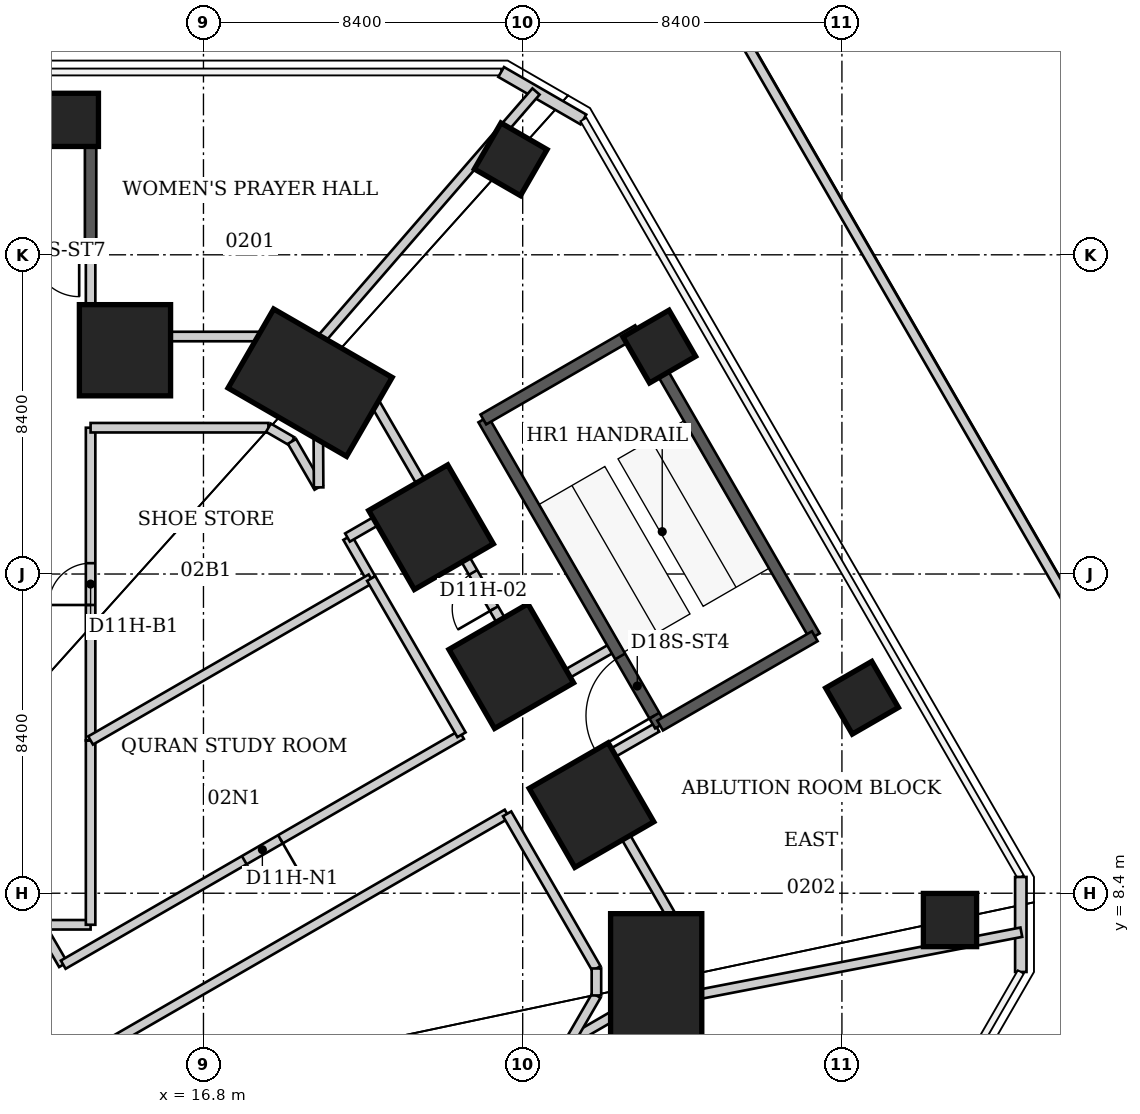
"""IFC4 building model, lengths in metres.
Left out: names, types, materials, properties, quantities, classifications, styles, units other than length and angle.
Written with IfcOpenShell. Run it as: python <this file> out.ifc"""

import sys

from ifc_helpers import new_model, si_unit, direction, frame, frame_2d, origin, origin_2d, place, context, subcontext, project, spatial, rectangle, extrude, element, fill, save


model = new_model("IFC4")
c1 = context("Model", 3, precision=1e-05, world=origin(), true_north=direction((0.0, 1.0)))
c2 = subcontext(c1, "Body", "Model", "MODEL_VIEW")
j1 = project(units=[si_unit("LENGTHUNIT", "METRE"), si_unit("PLANEANGLEUNIT", "RADIAN")], contexts=[c1])
p1 = place(None, origin())
s1 = spatial("IfcSite", under=j1, at=p1, CompositionType="ELEMENT")
p2 = place(p1, origin())
s2 = spatial("IfcBuilding", under=s1, at=p2, CompositionType="ELEMENT")
p3 = place(p2, frame((0.0, 0.0, 12.0)))
s3 = spatial("IfcBuildingStorey", under=s2, at=p3, CompositionType="ELEMENT", Elevation=12.0)
p4 = place(p3, frame((14.735, 22.689, 0.0), z_axis=(0.0, 0.0, 1.0), x_axis=(0.0, 1.0, 0.0)))
e1 = element("IfcColumn", 1, at=p4, inside=s3, PredefinedType="COLUMN", context=c2, shape_type="SweptSolid", body=[
    extrude(rectangle(XDim=2.4, YDim=2.4, at=origin_2d()), origin(), (0.0, 0.0, 1.0), 6.0),
])
p5 = place(p3, frame((19.606, 21.835, 0.0), z_axis=(0.0, 0.0, 1.0), x_axis=(0.5, 0.866025403784, 0.0)))
e2 = element("IfcColumn", 2, at=p5, inside=s3, PredefinedType="COLUMN", context=c2, shape_type="SweptSolid", body=[
    extrude(rectangle(XDim=2.4, YDim=3.6, at=origin_2d()), origin(), (0.0, 0.0, 1.0), 6.0),
])
for number, where, z_axis, x_axis in (
    (3, (22.788, 18.032, 0.0), (0.0, 0.0, 1.0), (0.866, 0.5, 0.0)),
    (4, (24.899, 14.375, 0.0), (0.0, 0.0, 1.0), (0.866, 0.5, 0.0)),
    (5, (27.01, 10.719, 0.0), (0.0, 0.0, 1.0), (0.866, 0.5, 0.0)),
):
    element("IfcColumn", number, at=place(p3, frame(where, z_axis=z_axis, x_axis=x_axis)), inside=s3, PredefinedType="COLUMN", context=c2, shape_type="SweptSolid", body=[
        extrude(rectangle(XDim=2.4, YDim=2.4, at=origin_2d()), origin(), (0.0, 0.0, 1.0), 6.0),
    ])
p6 = place(p3, frame((28.713, 6.062, 0.0), z_axis=(0.0, 0.0, 1.0), x_axis=(1.0, 0.0, 0.0)))
e6 = element("IfcColumn", 6, at=p6, inside=s3, PredefinedType="COLUMN", context=c2, shape_type="SweptSolid", body=[
    extrude(rectangle(XDim=2.4, YDim=3.6, at=origin_2d()), origin(), (0.0, 0.0, 1.0), 6.0),
])
for number, where, z_axis, x_axis in (
    (7, (13.337, 28.751, 0.0), (0.0, 0.0, 1.0), (0.0, 1.0, 0.0)),
    (8, (24.885, 27.714, 0.0), (0.0, 0.0, 1.0), (0.5, 0.866, 0.0)),
    (9, (28.794, 22.785, 0.0), (0.0, 0.0, 1.0), (0.866, 0.5, 0.0)),
    (10, (34.129, 13.544, 0.0), (0.0, 0.0, 1.0), (0.866, 0.5, 0.0)),
    (11, (36.443, 7.694, 0.0), (0.0, 0.0, 1.0), (1.0, 0.0, 0.0)),
):
    element("IfcColumn", number, at=place(p3, frame(where, z_axis=z_axis, x_axis=x_axis)), inside=s3, PredefinedType="COLUMN", context=c2, shape_type="SweptSolid", body=[
        extrude(rectangle(XDim=1.4, YDim=1.4, at=origin_2d()), origin(), (0.0, 0.0, 1.0), 6.0),
    ])
p7 = place(p3, frame((24.633, 30.011, 0.0), z_axis=(0.0, 0.0, 1.0), x_axis=(0.866047370643, -0.499961950354, 0.0)))
e12 = element("IfcWall", 12, at=p7, inside=s3, PredefinedType="SOLIDWALL", context=c2, shape_type="SweptSolid", body=[
    extrude(rectangle(XDim=2.5, YDim=0.3, at=frame_2d((1.25, 0.0))), origin(), (0.0, 0.0, 1.0), 5.6),
])
p8 = place(p3, frame((38.307, 8.828, 0.0), z_axis=(0.0, 0.0, 1.0), x_axis=(0.0, -1.0, 0.0)))
e13 = element("IfcWall", 13, at=p8, inside=s3, PredefinedType="SOLIDWALL", context=c2, shape_type="SweptSolid", body=[
    extrude(rectangle(XDim=2.5, YDim=0.3, at=frame_2d((1.25, 0.0))), origin(), (0.0, 0.0, 1.0), 5.6),
])
p9 = place(p3, frame((15.455, -40.895, 0.0), z_axis=(0.0, 0.0, 1.0), x_axis=(0.500000660882, 0.866025022224, 0.0)))
e14 = element("IfcWall", 14, at=p9, inside=s3, PredefinedType="PARAPET", context=c2, shape_type="SweptSolid", body=[
    extrude(rectangle(XDim=55.377, YDim=0.25, at=frame_2d((27.688, 0.0))), origin(), (0.0, 0.0, 1.0), 1.1),
])
p10 = place(p3, frame((43.146, 9.854, 0.0), z_axis=(0.0, 0.0, 1.0), x_axis=(-0.500004465561, 0.866022825576, 0.0)))
e15 = element("IfcWall", 15, at=p10, inside=s3, PredefinedType="PARAPET", context=c2, shape_type="SweptSolid", body=[
    extrude(rectangle(XDim=26.078, YDim=0.25, at=frame_2d((13.039, 0.0))), origin(), (0.0, 0.0, 1.0), 1.1),
])
p11 = place(p3, frame((12.23, 3.24, 0.0), z_axis=(0.0, 0.0, 1.0), x_axis=(0.866071776036, 0.499919672301, 0.0)))
e16 = element("IfcWall", 16, at=p11, inside=s3, PredefinedType="PARTITIONING", context=c2, shape_type="SweptSolid", body=[
    extrude(rectangle(XDim=14.502, YDim=0.25, at=frame_2d((7.251, 0.0))), origin(), (0.0, 0.0, 1.0), 5.84),
])
p12 = place(p3, frame((12.5, 7.57, 0.0), z_axis=(0.0, 0.0, 1.0), x_axis=(1.0, 0.0, 0.0)))
e17 = element("IfcWall", 17, at=p12, inside=s3, PredefinedType="PARTITIONING", context=c2, shape_type="SweptSolid", body=[
    extrude(rectangle(XDim=1.33, YDim=0.25, at=frame_2d((0.665, 0.0))), origin(), (0.0, 0.0, 1.0), 5.84),
])
p13 = place(p3, frame((13.11, 6.52, 0.0), z_axis=(0.0, 0.0, 1.0), x_axis=(-0.502382838514, 0.864645293497, 0.0)))
e18 = element("IfcWall", 18, at=p13, inside=s3, PredefinedType="PARTITIONING", context=c2, shape_type="SweptSolid", body=[
    extrude(rectangle(XDim=1.214, YDim=0.25, at=frame_2d((0.607, 0.0))), origin(), (0.0, 0.0, 1.0), 5.84),
])
p14 = place(p3, frame((13.83, 7.57, 0.0), z_axis=(0.0, 0.0, 1.0), x_axis=(0.0, 1.0, 0.0)))
e19 = element("IfcWall", 19, at=p14, inside=s3, PredefinedType="PARTITIONING", context=c2, shape_type="SweptSolid", body=[
    extrude(rectangle(XDim=4.85, YDim=0.25, at=frame_2d((2.425, 0.0))), origin(), (0.0, 0.0, 1.0), 5.84),
])
p15 = place(p3, frame((13.83, 12.42, 0.0), z_axis=(0.0, 0.0, 1.0), x_axis=(0.0, 1.0, 0.0)))
e20 = element("IfcWall", 20, at=p15, inside=s3, PredefinedType="PARTITIONING", context=c2, shape_type="SweptSolid", body=[
    extrude(rectangle(XDim=8.23, YDim=0.25, at=frame_2d((4.115, 0.0))), origin(), (0.0, 0.0, 1.0), 5.84),
])
p16 = place(p15, frame((3.565, 0.0, 0.0)))
e21 = element("IfcOpeningElement", 21, at=p16, cuts=e20, PredefinedType="OPENING", context=c2, shape_type="SweptSolid", body=[
    extrude(rectangle(XDim=1.1, YDim=2.2, at=frame_2d((0.55, 1.1))), frame((0.0, 0.125, 0.0), z_axis=(0.0, -1.0, 0.0), x_axis=(1.0, 0.0, 0.0)), (0.0, 0.0, 1.0), 0.25),
])
p17 = place(p3, frame((13.83, 20.65, 0.0), z_axis=(0.0, 0.0, 1.0), x_axis=(1.0, 0.0, 0.0)))
e22 = element("IfcWall", 22, at=p17, inside=s3, PredefinedType="PARTITIONING", context=c2, shape_type="SweptSolid", body=[
    extrude(rectangle(XDim=4.68, YDim=0.25, at=frame_2d((2.34, 0.0))), origin(), (0.0, 0.0, 1.0), 5.84),
])
p18 = place(p3, frame((13.83, 23.05, 0.0), z_axis=(0.0, 0.0, 1.0), x_axis=(0.0, 1.0, 0.0)))
e23 = element("IfcWall", 23, at=p18, inside=s3, PredefinedType="PARTITIONING", context=c2, shape_type="SweptSolid", body=[
    extrude(rectangle(XDim=2.15, YDim=0.25, at=frame_2d((1.075, 0.0))), origin(), (0.0, 0.0, 1.0), 5.6),
])
p19 = place(p3, frame((17.25, -16.23, 0.0), z_axis=(0.0, 0.0, 1.0), x_axis=(0.499945975705, 0.866056592479, 0.0)))
e24 = element("IfcWall", 24, at=p19, inside=s3, PredefinedType="PARTITIONING", context=c2, shape_type="SweptSolid", body=[
    extrude(rectangle(XDim=24.583, YDim=0.25, at=frame_2d((12.292, 0.0))), origin(), (0.0, 0.0, 1.0), 4.04),
])
p20 = place(p3, frame((18.51, 20.65, 0.0), z_axis=(0.0, 0.0, 1.0), x_axis=(0.864827114446, -0.502069778138, 0.0)))
e25 = element("IfcWall", 25, at=p20, inside=s3, PredefinedType="PARTITIONING", context=c2, shape_type="SweptSolid", body=[
    extrude(rectangle(XDim=0.717, YDim=0.25, at=frame_2d((0.358, 0.0))), origin(), (0.0, 0.0, 1.0), 5.84),
])
p21 = place(p3, frame((19.13, 20.29, 0.0), z_axis=(0.0, 0.0, 1.0), x_axis=(0.500871040665, -0.865521923826, 0.0)))
e26 = element("IfcWall", 26, at=p21, inside=s3, PredefinedType="PARTITIONING", context=c2, shape_type="SweptSolid", body=[
    extrude(rectangle(XDim=1.398, YDim=0.25, at=frame_2d((0.699, 0.0))), origin(), (0.0, 0.0, 1.0), 5.84),
])
p22 = place(p3, frame((19.15, 23.05, 0.0), z_axis=(0.0, 0.0, 1.0), x_axis=(-1.0, 0.0, 0.0)))
e27 = element("IfcWall", 27, at=p22, inside=s3, PredefinedType="PARTITIONING", context=c2, shape_type="SweptSolid", body=[
    extrude(rectangle(XDim=5.32, YDim=0.25, at=frame_2d((2.66, 0.0))), origin(), (0.0, 0.0, 1.0), 4.04),
])
p23 = place(p3, frame((19.15, 23.05, 0.0), z_axis=(0.0, 0.0, 1.0), x_axis=(0.866627900645, -0.498954989777, 0.0)))
e28 = element("IfcWall", 28, at=p23, inside=s3, PredefinedType="PARTITIONING", context=c2, shape_type="SweptSolid", body=[
    extrude(rectangle(XDim=0.588, YDim=0.25, at=frame_2d((0.294, 0.0))), origin(), (0.0, 0.0, 1.0), 5.84),
])
p24 = place(p3, frame((19.733, 22.715, 0.0), z_axis=(0.0, 0.0, 1.0), x_axis=(0.866550582058, -0.499089259287, 0.0)))
e29 = element("IfcWall", 29, at=p24, inside=s3, PredefinedType="PARTITIONING", context=c2, shape_type="SweptSolid", body=[
    extrude(rectangle(XDim=0.089, YDim=0.25, at=frame_2d((0.044, 0.0))), origin(), (0.0, 0.0, 1.0), 5.84),
])
p25 = place(p3, frame((19.83, 19.08, 0.0), z_axis=(0.0, 0.0, 1.0), x_axis=(-0.005576247883, 0.999984452609, 0.0)))
e30 = element("IfcWall", 30, at=p25, inside=s3, PredefinedType="PARTITIONING", context=c2, shape_type="SweptSolid", body=[
    extrude(rectangle(XDim=3.59, YDim=0.25, at=frame_2d((1.795, 0.0))), origin(), (0.0, 0.0, 1.0), 5.84),
])
p26 = place(p3, frame((20.59, 17.76, 0.0), z_axis=(0.0, 0.0, 1.0), x_axis=(0.497763752085, -0.867312658221, 0.0)))
e31 = element("IfcWall", 31, at=p26, inside=s3, PredefinedType="PARTITIONING", context=c2, shape_type="SweptSolid", body=[
    extrude(rectangle(XDim=1.245, YDim=0.25, at=frame_2d((0.623, 0.0))), origin(), (0.0, 0.0, 1.0), 5.84),
])
p27 = place(p3, frame((20.88, 22.05, 0.0), z_axis=(0.0, 0.0, 1.0), x_axis=(-0.865250488556, 0.501339796998, 0.0)))
e32 = element("IfcWall", 32, at=p27, inside=s3, PredefinedType="PARTITIONING", context=c2, shape_type="SweptSolid", body=[
    extrude(rectangle(XDim=1.236, YDim=0.25, at=frame_2d((0.618, 0.0))), origin(), (0.0, 0.0, 1.0), 5.84),
])
p28 = place(p3, frame((21.21, 16.68, 0.0), z_axis=(0.0, 0.0, 1.0), x_axis=(-0.866064405698, -0.499932440619, 0.0)))
e33 = element("IfcWall", 33, at=p28, inside=s3, PredefinedType="PARTITIONING", context=c2, shape_type="SweptSolid", body=[
    extrude(rectangle(XDim=8.521, YDim=0.25, at=frame_2d((4.261, 0.0))), origin(), (0.0, 0.0, 1.0), 5.84),
])
p29 = place(p3, frame((22.67, 18.96, 0.0), z_axis=(0.0, 0.0, 1.0), x_axis=(-0.866177122335, -0.499737123639, 0.0)))
e34 = element("IfcWall", 34, at=p29, inside=s3, PredefinedType="PARTITIONING", context=c2, shape_type="SweptSolid", body=[
    extrude(rectangle(XDim=2.401, YDim=0.25, at=frame_2d((1.201, 0.0))), origin(), (0.0, 0.0, 1.0), 5.84),
])
p30 = place(p3, frame((22.67, 18.96, 0.0), z_axis=(0.0, 0.0, 1.0), x_axis=(-0.501254541389, 0.865299881392, 0.0)))
e35 = element("IfcWall", 35, at=p30, inside=s3, PredefinedType="PARTITIONING", context=c2, shape_type="SweptSolid", body=[
    extrude(rectangle(XDim=3.571, YDim=0.25, at=frame_2d((1.786, 0.0))), origin(), (0.0, 0.0, 1.0), 5.84),
])
p31 = place(p3, frame((23.59, 12.57, 0.0), z_axis=(0.0, 0.0, 1.0), x_axis=(-0.866045825216, -0.499964627375, 0.0)))
e36 = element("IfcWall", 36, at=p31, inside=s3, PredefinedType="PARTITIONING", context=c2, shape_type="SweptSolid", body=[
    extrude(rectangle(XDim=12.101, YDim=0.25, at=frame_2d((6.051, 0.0))), origin(), (0.0, 0.0, 1.0), 5.84),
])
p32 = place(p31, frame((5.5, 0.0, 0.0)))
e37 = element("IfcOpeningElement", 37, at=p32, cuts=e36, PredefinedType="OPENING", context=c2, shape_type="SweptSolid", body=[
    extrude(rectangle(XDim=1.1, YDim=2.2, at=frame_2d((0.55, 1.1))), frame((0.0, 0.125, 0.0), z_axis=(0.0, -1.0, 0.0), x_axis=(1.0, 0.0, 0.0)), (0.0, 0.0, 1.0), 0.25),
])
p33 = place(p3, frame((23.59, 12.57, 0.0), z_axis=(0.0, 0.0, 1.0), x_axis=(-0.500472849402, 0.865752231884, 0.0)))
e38 = element("IfcWall", 38, at=p33, inside=s3, PredefinedType="PARTITIONING", context=c2, shape_type="SweptSolid", body=[
    extrude(rectangle(XDim=4.75, YDim=0.25, at=frame_2d((2.375, 0.0))), origin(), (0.0, 0.0, 1.0), 5.84),
])
p34 = place(p3, frame((24.79, 10.49, 0.0), z_axis=(0.0, 0.0, 1.0), x_axis=(0.499999753078, -0.866025546345, 0.0)))
e39 = element("IfcWall", 39, at=p34, inside=s3, PredefinedType="PARTITIONING", context=c2, shape_type="SweptSolid", body=[
    extrude(rectangle(XDim=4.7, YDim=0.25, at=frame_2d((2.35, 0.0))), origin(), (0.0, 0.0, 1.0), 5.84),
])
p35 = place(p3, frame((25.55, 29.497, 0.0), z_axis=(0.0, 0.0, 1.0), x_axis=(-0.655186130594, -0.755467493859, 0.0)))
e40 = element("IfcWall", 40, at=p35, inside=s3, PredefinedType="PARTITIONING", context=c2, shape_type="SweptSolid", body=[
    extrude(rectangle(XDim=8.945, YDim=0.25, at=frame_2d((4.472, 0.0))), origin(), (0.0, 0.0, 1.0), 5.6),
])
p36 = place(p3, frame((25.67, 13.77, 0.0), z_axis=(0.0, 0.0, 1.0), x_axis=(-0.50044857655, 0.865766263046, 0.0)))
e41 = element("IfcWall", 41, at=p36, inside=s3, PredefinedType="PARTITIONING", context=c2, shape_type="SweptSolid", body=[
    extrude(rectangle(XDim=5.995, YDim=0.25, at=frame_2d((2.997, 0.0))), origin(), (0.0, 0.0, 1.0), 4.04),
])
p37 = place(p36, frame((2.448, 0.0, 0.0)))
e42 = element("IfcOpeningElement", 42, at=p37, cuts=e41, PredefinedType="OPENING", context=c2, shape_type="SweptSolid", body=[
    extrude(rectangle(XDim=1.1, YDim=2.2, at=frame_2d((0.55, 1.1))), frame((0.0, 0.125, 0.0), z_axis=(0.0, -1.0, 0.0), x_axis=(1.0, 0.0, 0.0)), (0.0, 0.0, 1.0), 0.25),
])
p38 = place(p3, frame((26.45, 4.52, 0.0), z_axis=(0.0, 0.0, 1.0), x_axis=(0.865299881392, 0.501254541389, 0.0)))
e43 = element("IfcWall", 43, at=p38, inside=s3, PredefinedType="PARTITIONING", context=c2, shape_type="SweptSolid", body=[
    extrude(rectangle(XDim=3.571, YDim=0.25, at=frame_2d((1.786, 0.0))), origin(), (0.0, 0.0, 1.0), 5.84),
])
p39 = place(p3, frame((26.87, 11.69, 0.0), z_axis=(0.0, 0.0, 1.0), x_axis=(0.866775979586, 0.498697705241, 0.0)))
e44 = element("IfcWall", 44, at=p39, inside=s3, PredefinedType="PARTITIONING", context=c2, shape_type="SweptSolid", body=[
    extrude(rectangle(XDim=2.146, YDim=0.25, at=frame_2d((1.073, 0.0))), origin(), (0.0, 0.0, 1.0), 5.6),
])
p40 = place(p3, frame((27.14, 5.71, 0.0), z_axis=(0.0, 0.0, 1.0), x_axis=(-0.501595895466, -0.865102050426, 0.0)))
e45 = element("IfcWall", 45, at=p40, inside=s3, PredefinedType="PARTITIONING", context=c2, shape_type="SweptSolid", body=[
    extrude(rectangle(XDim=1.375, YDim=0.25, at=frame_2d((0.688, 0.0))), origin(), (0.0, 0.0, 1.0), 5.84),
])
p41 = place(p3, frame((27.14, 6.42, 0.0), z_axis=(0.0, 0.0, 1.0), x_axis=(0.0, -1.0, 0.0)))
e46 = element("IfcWall", 46, at=p41, inside=s3, PredefinedType="PARTITIONING", context=c2, shape_type="SweptSolid", body=[
    extrude(rectangle(XDim=0.71, YDim=0.25, at=frame_2d((0.355, 0.0))), origin(), (0.0, 0.0, 1.0), 5.84),
])
p42 = place(p3, frame((27.53, 14.84, 0.0), z_axis=(0.0, 0.0, 1.0), x_axis=(-0.866804272416, -0.498648526841, 0.0)))
e47 = element("IfcWall", 47, at=p42, inside=s3, PredefinedType="PARTITIONING", context=c2, shape_type="SweptSolid", body=[
    extrude(rectangle(XDim=2.146, YDim=0.25, at=frame_2d((1.073, 0.0))), origin(), (0.0, 0.0, 1.0), 5.6),
])
p43 = place(p3, frame((29.54, 5.06, 0.0), z_axis=(0.0, 0.0, 1.0), x_axis=(0.0, 1.0, 0.0)))
e48 = element("IfcWall", 48, at=p43, inside=s3, PredefinedType="PARTITIONING", context=c2, shape_type="SweptSolid", body=[
    extrude(rectangle(XDim=0.585, YDim=0.25, at=frame_2d((0.292, 0.0))), origin(), (0.0, 0.0, 1.0), 5.84),
])
p44 = place(p3, frame((29.54, 5.68, 0.0), z_axis=(0.0, 0.0, 1.0), x_axis=(0.0, 1.0, 0.0)))
e49 = element("IfcWall", 49, at=p44, inside=s3, PredefinedType="PARTITIONING", context=c2, shape_type="SweptSolid", body=[
    extrude(rectangle(XDim=0.63, YDim=0.25, at=frame_2d((0.315, 0.0))), origin(), (0.0, 0.0, 1.0), 5.84),
])
p45 = place(p3, frame((29.54, 6.31, 0.0), z_axis=(0.0, 0.0, 1.0), x_axis=(0.0, 1.0, 0.0)))
e50 = element("IfcWall", 50, at=p45, inside=s3, PredefinedType="PARTITIONING", context=c2, shape_type="SweptSolid", body=[
    extrude(rectangle(XDim=0.75, YDim=0.25, at=frame_2d((0.375, 0.0))), origin(), (0.0, 0.0, 1.0), 5.84),
])
p46 = place(p3, frame((29.54, 7.06, 0.0), z_axis=(0.0, 0.0, 1.0), x_axis=(-0.499558989476, 0.866279871655, 0.0)))
e51 = element("IfcWall", 51, at=p46, inside=s3, PredefinedType="PARTITIONING", context=c2, shape_type="SweptSolid", body=[
    extrude(rectangle(XDim=5.344, YDim=0.25, at=frame_2d((2.672, 0.0))), origin(), (0.0, 0.0, 1.0), 4.04),
])
p47 = place(p3, frame((38.321, 7.374, 0.0), z_axis=(0.0, 0.0, 1.0), x_axis=(-0.981886490476, -0.189470102708, 0.0)))
e52 = element("IfcWall", 52, at=p47, inside=s3, PredefinedType="PARTITIONING", context=c2, shape_type="SweptSolid", body=[
    extrude(rectangle(XDim=8.942, YDim=0.25, at=frame_2d((4.471, 0.0))), origin(), (0.0, 0.0, 1.0), 5.6),
])
p48 = place(p3, frame((28.815, 12.813, 0.0), z_axis=(0.0, 0.0, 1.0), x_axis=(-0.500015592816, 0.866016401081, 0.0)))
e53 = element("IfcWall", 53, at=p48, inside=s3, PredefinedType="SHEAR", context=c2, shape_type="SweptSolid", body=[
    extrude(rectangle(XDim=9.3, YDim=0.3, at=frame_2d((4.65, 0.0))), origin(), (0.0, 0.0, 1.0), 6.0),
])
p49 = place(p48, frame((0.3, 0.0, 0.0)))
e54 = element("IfcOpeningElement", 54, at=p49, cuts=e53, PredefinedType="OPENING", context=c2, shape_type="SweptSolid", body=[
    extrude(rectangle(XDim=1.8, YDim=2.4, at=frame_2d((0.9, 1.2))), frame((0.0, 0.15, 0.0), z_axis=(0.0, -1.0, 0.0), x_axis=(1.0, 0.0, 0.0)), (0.0, 0.0, 1.0), 0.3),
])
p50 = place(p3, frame((24.165, 20.867, 0.0), z_axis=(0.0, 0.0, 1.0), x_axis=(0.866016039709, 0.500016218704, 0.0)))
e55 = element("IfcWall", 55, at=p50, inside=s3, PredefinedType="SHEAR", context=c2, shape_type="SweptSolid", body=[
    extrude(rectangle(XDim=4.7, YDim=0.3, at=frame_2d((2.35, 0.0))), origin(), (0.0, 0.0, 1.0), 6.0),
])
p51 = place(p3, frame((28.235, 23.217, 0.0), z_axis=(0.0, 0.0, 1.0), x_axis=(0.500004225487, -0.866022964185, 0.0)))
e56 = element("IfcWall", 56, at=p51, inside=s3, PredefinedType="SHEAR", context=c2, shape_type="SweptSolid", body=[
    extrude(rectangle(XDim=9.3, YDim=0.3, at=frame_2d((4.65, 0.0))), origin(), (0.0, 0.0, 1.0), 6.0),
])
p52 = place(p3, frame((32.885, 15.163, 0.0), z_axis=(0.0, 0.0, 1.0), x_axis=(-0.866038532462, -0.499977259774, 0.0)))
e57 = element("IfcWall", 57, at=p52, inside=s3, PredefinedType="SHEAR", context=c2, shape_type="SweptSolid", body=[
    extrude(rectangle(XDim=4.7, YDim=0.3, at=frame_2d((2.35, 0.0))), origin(), (0.0, 0.0, 1.0), 6.0),
])
p53 = place(p3, frame((13.83, 25.299, 0.0), z_axis=(0.0, 0.0, 1.0), x_axis=(-1.0, 0.0, 0.0)))
e58 = element("IfcWall", 58, at=p53, inside=s3, PredefinedType="SHEAR", context=c2, shape_type="SweptSolid", body=[
    extrude(rectangle(XDim=9.3, YDim=0.3, at=frame_2d((4.65, 0.0))), origin(), (0.0, 0.0, 1.0), 6.0),
])
p54 = place(p53, frame((0.3, 0.0, 0.0)))
e59 = element("IfcOpeningElement", 59, at=p54, cuts=e58, PredefinedType="OPENING", context=c2, shape_type="SweptSolid", body=[
    extrude(rectangle(XDim=1.2, YDim=2.4, at=frame_2d((0.6, 1.2))), frame((0.0, 0.15, 0.0), z_axis=(0.0, -1.0, 0.0), x_axis=(1.0, 0.0, 0.0)), (0.0, 0.0, 1.0), 0.3),
])
p55 = place(p3, frame((4.53, 28.799, 0.0), z_axis=(0.0, 0.0, 1.0), x_axis=(1.0, 0.0, 0.0)))
e60 = element("IfcWall", 60, at=p55, inside=s3, PredefinedType="SHEAR", context=c2, shape_type="SweptSolid", body=[
    extrude(rectangle(XDim=9.3, YDim=0.3, at=frame_2d((4.65, 0.0))), origin(), (0.0, 0.0, 1.0), 6.0),
])
p56 = place(p3, frame((13.83, 28.799, 0.0), z_axis=(0.0, 0.0, 1.0), x_axis=(0.0, -1.0, 0.0)))
e61 = element("IfcWall", 61, at=p56, inside=s3, PredefinedType="SHEAR", context=c2, shape_type="SweptSolid", body=[
    extrude(rectangle(XDim=3.5, YDim=0.3, at=frame_2d((1.75, 0.0))), origin(), (0.0, 0.0, 1.0), 6.0),
])
p57 = place(p37, origin())
e62 = element("IfcDoor", 62, at=p57, inside=s3, OperationType="SINGLE_SWING_LEFT", PredefinedType="DOOR", context=c2, shape_type="SweptSolid", body=[
    extrude(rectangle(XDim=1.1, YDim=2.2, at=frame_2d((0.55, 1.1))), frame((0.0, 0.025, 0.0), z_axis=(0.0, -1.0, 0.0), x_axis=(1.0, 0.0, 0.0)), (0.0, 0.0, 1.0), 0.05),
])
fill(e42, e62)
p58 = place(p16, origin())
e63 = element("IfcDoor", 63, at=p58, inside=s3, OperationType="SINGLE_SWING_LEFT", PredefinedType="DOOR", context=c2, shape_type="SweptSolid", body=[
    extrude(rectangle(XDim=1.1, YDim=2.2, at=frame_2d((0.55, 1.1))), frame((0.0, 0.025, 0.0), z_axis=(0.0, -1.0, 0.0), x_axis=(1.0, 0.0, 0.0)), (0.0, 0.0, 1.0), 0.05),
])
fill(e21, e63)
p59 = place(p32, origin())
e64 = element("IfcDoor", 64, at=p59, inside=s3, OperationType="SINGLE_SWING_LEFT", PredefinedType="DOOR", context=c2, shape_type="SweptSolid", body=[
    extrude(rectangle(XDim=1.1, YDim=2.2, at=frame_2d((0.55, 1.1))), frame((0.0, 0.025, 0.0), z_axis=(0.0, -1.0, 0.0), x_axis=(1.0, 0.0, 0.0)), (0.0, 0.0, 1.0), 0.05),
])
fill(e37, e64)
p60 = place(p49, origin())
e65 = element("IfcDoor", 65, at=p60, inside=s3, OperationType="DOUBLE_DOOR_SINGLE_SWING", PredefinedType="DOOR", context=c2, shape_type="SweptSolid", body=[
    extrude(rectangle(XDim=1.8, YDim=2.4, at=frame_2d((0.9, 1.2))), frame((0.0, 0.025, 0.0), z_axis=(0.0, -1.0, 0.0), x_axis=(1.0, 0.0, 0.0)), (0.0, 0.0, 1.0), 0.05),
])
fill(e54, e65)
p61 = place(p54, origin())
e66 = element("IfcDoor", 66, at=p61, inside=s3, OperationType="SINGLE_SWING_LEFT", PredefinedType="DOOR", context=c2, shape_type="SweptSolid", body=[
    extrude(rectangle(XDim=1.2, YDim=2.4, at=frame_2d((0.6, 1.2))), frame((0.0, 0.025, 0.0), z_axis=(0.0, -1.0, 0.0), x_axis=(1.0, 0.0, 0.0)), (0.0, 0.0, 1.0), 0.05),
])
fill(e59, e66)
save(model, sys.argv[1])
